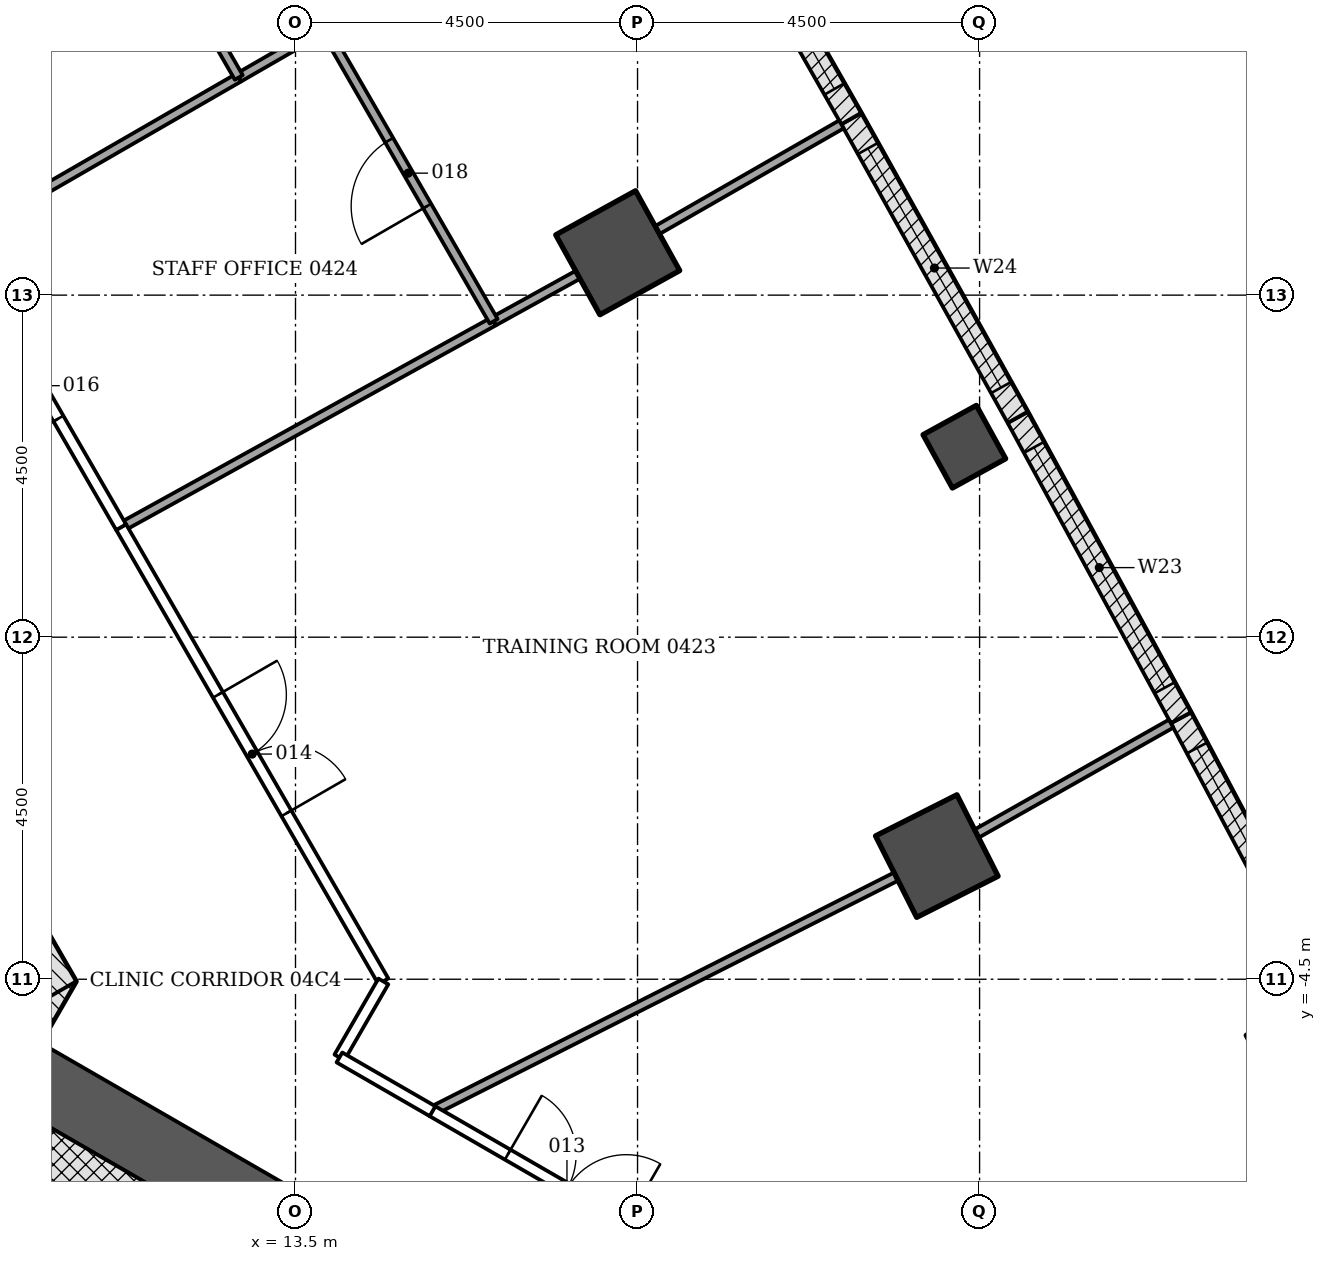
"""IFC4 building model, lengths in metres.
Left out: names, types, materials, properties, quantities, classifications, styles, units other than length and angle.
Written with IfcOpenShell. Run it as: python <this file> out.ifc"""

import sys

from ifc_helpers import new_model, si_unit, direction, frame, frame_2d, origin, origin_2d, place, context, subcontext, project, spatial, rectangle, extrude, element, fill, save


model = new_model("IFC4")
c1 = context("Model", 3, precision=1e-05, world=origin(), true_north=direction((0.0, 1.0)))
c2 = subcontext(c1, "Body", "Model", "MODEL_VIEW")
j1 = project(units=[si_unit("LENGTHUNIT", "METRE"), si_unit("PLANEANGLEUNIT", "RADIAN")], contexts=[c1])
p1 = place(None, origin())
s1 = spatial("IfcSite", under=j1, at=p1, CompositionType="ELEMENT")
p2 = place(p1, origin())
s2 = spatial("IfcBuilding", under=s1, at=p2, CompositionType="ELEMENT")
p3 = place(p2, frame((0.0, 0.0, 19.5)))
s3 = spatial("IfcBuildingStorey", under=s2, at=p3, CompositionType="ELEMENT", Elevation=19.5)
for number, where, z_axis, x_axis in (
    (1, (21.937, -2.88, -0.25), (0.0, 0.0, 1.0), (0.893, 0.451, 0.0)),
    (2, (17.739, 5.058, -0.25), (0.0, 0.0, 1.0), (0.875, 0.484, 0.0)),
):
    element("IfcColumn", number, at=place(p3, frame(where, z_axis=z_axis, x_axis=x_axis)), inside=s3, PredefinedType="COLUMN", context=c2, shape_type="SweptSolid", body=[
        extrude(rectangle(XDim=1.2, YDim=1.2, at=origin_2d()), origin(), (0.0, 0.0, 1.0), 4.55),
    ])
for number, where, z_axis, x_axis in (
    (3, (26.548, -5.406, -0.25), (0.0, 0.0, 1.0), (0.886, 0.464, 0.0)),
    (4, (22.3, 2.506, -0.25), (0.0, 0.0, 1.0), (0.876, 0.482, 0.0)),
):
    element("IfcColumn", number, at=place(p3, frame(where, z_axis=z_axis, x_axis=x_axis)), inside=s3, PredefinedType="COLUMN", context=c2, shape_type="SweptSolid", body=[
        extrude(rectangle(XDim=0.8, YDim=0.8, at=origin_2d()), origin(), (0.0, 0.0, 1.0), 4.55),
    ])
p4 = place(p3, frame((8.926, -6.753, -0.25), z_axis=(0.0, 0.0, 1.0), x_axis=(0.500042739161, 0.866000726912, 0.0)))
e5 = element("IfcWall", 5, at=p4, inside=s3, PredefinedType="SHEAR", context=c2, shape_type="SweptSolid", body=[
    extrude(rectangle(XDim=2.771, YDim=0.7, at=frame_2d((1.386, 0.0))), origin(), (0.0, 0.0, 1.0), 4.55),
])
p5 = place(p3, frame((10.311, -4.703, -0.25), z_axis=(0.0, 0.0, 1.0), x_axis=(-0.500001446645, 0.866024568562, 0.0)))
e6 = element("IfcWall", 6, at=p5, inside=s3, PredefinedType="SHEAR", context=c2, shape_type="SweptSolid", body=[
    extrude(rectangle(XDim=18.458, YDim=0.7, at=frame_2d((9.229, 0.0))), origin(), (0.0, 0.0, 1.0), 4.55),
])
p6 = place(p5, frame((8.7, 0.0, 0.25)))
e7 = element("IfcOpeningElement", 7, at=p6, cuts=e6, PredefinedType="OPENING", context=c2, shape_type="SweptSolid", body=[
    extrude(rectangle(XDim=1.0, YDim=2.1, at=frame_2d((0.5, 1.05))), frame((0.0, 0.36, 0.0), z_axis=(0.0, -1.0, 0.0), x_axis=(1.0, 0.0, 0.0)), (0.0, 0.0, 1.0), 0.72),
])
p7 = place(p5, frame((4.002, 0.0, 0.25)))
e8 = element("IfcOpeningElement", 8, at=p7, cuts=e6, PredefinedType="OPENING", context=c2, shape_type="SweptSolid", body=[
    extrude(rectangle(XDim=0.9, YDim=2.1, at=frame_2d((0.45, 1.05))), frame((0.0, 0.36, 0.0), z_axis=(0.0, -1.0, 0.0), x_axis=(1.0, 0.0, 0.0)), (0.0, 0.0, 1.0), 0.72),
])
p8 = place(p5, frame((14.093, 0.0, 0.25)))
e9 = element("IfcOpeningElement", 9, at=p8, cuts=e6, PredefinedType="OPENING", context=c2, shape_type="SweptSolid", body=[
    extrude(rectangle(XDim=0.9, YDim=2.1, at=frame_2d((0.45, 1.05))), frame((0.0, 0.36, 0.0), z_axis=(0.0, -1.0, 0.0), x_axis=(1.0, 0.0, 0.0)), (0.0, 0.0, 1.0), 0.72),
])
p9 = place(p3, frame((9.922, -5.728, -0.25), z_axis=(0.0, 0.0, 1.0), x_axis=(0.866028046028, -0.499995423472, 0.0)))
e10 = element("IfcWall", 10, at=p9, inside=s3, PredefinedType="SHEAR", context=c2, shape_type="SweptSolid", body=[
    extrude(rectangle(XDim=14.633, YDim=0.9, at=frame_2d((7.316, 0.0))), origin(), (0.0, 0.0, 1.0), 4.55),
])
p10 = place(p9, frame((7.35, 0.0, 0.25)))
e11 = element("IfcOpeningElement", 11, at=p10, cuts=e10, PredefinedType="OPENING", context=c2, shape_type="SweptSolid", body=[
    extrude(rectangle(XDim=1.5, YDim=2.1, at=frame_2d((0.75, 1.05))), frame((0.0, 0.46, 0.0), z_axis=(0.0, -1.0, 0.0), x_axis=(1.0, 0.0, 0.0)), (0.0, 0.0, 1.0), 0.92),
])
p11 = place(p3, frame((25.15, -1.062, 0.0), z_axis=(0.0, 0.0, 1.0), x_axis=(0.468566202388, -0.883428386447, 0.0)))
e12 = element("IfcWall", 12, at=p11, inside=s3, PredefinedType="NOTDEFINED", context=c2, shape_type="SweptSolid", body=[
    extrude(rectangle(XDim=4.496, YDim=0.3, at=frame_2d((2.248, 0.0))), origin(), (0.0, 0.0, 1.0), 4.3),
])
p12 = place(p11, frame((0.448, 0.0, 1.5)))
e13 = element("IfcOpeningElement", 13, at=p12, cuts=e12, PredefinedType="OPENING", context=c2, shape_type="SweptSolid", body=[
    extrude(rectangle(XDim=3.6, YDim=1.8, at=frame_2d((1.8, 0.9))), frame((0.0, 0.16, 0.0), z_axis=(0.0, -1.0, 0.0), x_axis=(1.0, 0.0, 0.0)), (0.0, 0.0, 1.0), 0.32),
])
p13 = place(p3, frame((23.001, 2.89, 0.0), z_axis=(0.0, 0.0, 1.0), x_axis=(0.477577109439, -0.878589838628, 0.0)))
e14 = element("IfcWall", 14, at=p13, inside=s3, PredefinedType="NOTDEFINED", context=c2, shape_type="SweptSolid", body=[
    extrude(rectangle(XDim=4.496, YDim=0.3, at=frame_2d((2.248, 0.0))), origin(), (0.0, 0.0, 1.0), 4.3),
])
p14 = place(p13, frame((0.448, 0.0, 1.5)))
e15 = element("IfcOpeningElement", 15, at=p14, cuts=e14, PredefinedType="OPENING", context=c2, shape_type="SweptSolid", body=[
    extrude(rectangle(XDim=3.6, YDim=1.8, at=frame_2d((1.8, 0.9))), frame((0.0, 0.16, 0.0), z_axis=(0.0, -1.0, 0.0), x_axis=(1.0, 0.0, 0.0)), (0.0, 0.0, 1.0), 0.32),
])
p15 = place(p3, frame((20.812, 6.82, 0.0), z_axis=(0.0, 0.0, 1.0), x_axis=(0.486606252415, -0.873621402617, 0.0)))
e16 = element("IfcWall", 16, at=p15, inside=s3, PredefinedType="NOTDEFINED", context=c2, shape_type="SweptSolid", body=[
    extrude(rectangle(XDim=4.496, YDim=0.3, at=frame_2d((2.248, 0.0))), origin(), (0.0, 0.0, 1.0), 4.3),
])
p16 = place(p15, frame((0.448, 0.0, 1.5)))
e17 = element("IfcOpeningElement", 17, at=p16, cuts=e16, PredefinedType="OPENING", context=c2, shape_type="SweptSolid", body=[
    extrude(rectangle(XDim=3.6, YDim=1.8, at=frame_2d((1.8, 0.9))), frame((0.0, 0.16, 0.0), z_axis=(0.0, -1.0, 0.0), x_axis=(1.0, 0.0, 0.0)), (0.0, 0.0, 1.0), 0.32),
])
p17 = place(p3, frame((18.583, 10.728, 0.0), z_axis=(0.0, 0.0, 1.0), x_axis=(0.495524760411, -0.868593812907, 0.0)))
e18 = element("IfcWall", 18, at=p17, inside=s3, PredefinedType="NOTDEFINED", context=c2, shape_type="SweptSolid", body=[
    extrude(rectangle(XDim=4.496, YDim=0.3, at=frame_2d((2.248, 0.0))), origin(), (0.0, 0.0, 1.0), 4.3),
])
p18 = place(p17, frame((0.448, 0.0, 1.5)))
e19 = element("IfcOpeningElement", 19, at=p18, cuts=e18, PredefinedType="OPENING", context=c2, shape_type="SweptSolid", body=[
    extrude(rectangle(XDim=3.6, YDim=1.8, at=frame_2d((1.8, 0.9))), frame((0.0, 0.16, 0.0), z_axis=(0.0, -1.0, 0.0), x_axis=(1.0, 0.0, 0.0)), (0.0, 0.0, 1.0), 0.32),
])
p19 = place(p3, frame((9.413, -6.61, -0.25), z_axis=(0.0, 0.0, 1.0), x_axis=(0.866018442252, -0.500012057535, 0.0)))
e20 = element("IfcWall", 20, at=p19, inside=s3, PredefinedType="SHEAR", context=c2, shape_type="SweptSolid", body=[
    extrude(rectangle(XDim=7.2, YDim=1.136, at=frame_2d((3.6, 0.0))), origin(), (0.0, 0.0, 1.0), 4.55),
])
p20 = place(p3, frame((21.401, -3.15, 0.0), z_axis=(0.0, 0.0, 1.0), x_axis=(-0.892483368892, -0.451080299117, 0.0)))
e21 = element("IfcWall", 21, at=p20, inside=s3, PredefinedType="PARTITIONING", context=c2, shape_type="SweptSolid", body=[
    extrude(rectangle(XDim=6.837, YDim=0.12, at=frame_2d((3.418, 0.0))), origin(), (0.0, 0.0, 1.0), 3.767),
])
p21 = place(p3, frame((25.02, -1.138, 0.0), z_axis=(0.0, 0.0, 1.0), x_axis=(-0.870620069476, -0.491955988505, 0.0)))
e22 = element("IfcWall", 22, at=p21, inside=s3, PredefinedType="PARTITIONING", context=c2, shape_type="SweptSolid", body=[
    extrude(rectangle(XDim=2.939, YDim=0.12, at=frame_2d((1.47, 0.0))), origin(), (0.0, 0.0, 1.0), 3.683),
])
p22 = place(p3, frame((15.296, -6.233, 0.0), z_axis=(0.0, 0.0, 1.0), x_axis=(0.866035577775, -0.499982377718, 0.0)))
e23 = element("IfcWall", 23, at=p22, inside=s3, PredefinedType="PARTITIONING", context=c2, shape_type="SweptSolid", body=[
    extrude(rectangle(XDim=4.093, YDim=0.15, at=frame_2d((2.046, 0.0))), origin(), (0.0, 0.0, 1.0), 3.767),
])
p23 = place(p22, frame((1.15, 0.0, 0.0)))
e24 = element("IfcOpeningElement", 24, at=p23, cuts=e23, PredefinedType="OPENING", context=c2, shape_type="SweptSolid", body=[
    extrude(rectangle(XDim=1.8, YDim=2.1, at=frame_2d((0.9, 1.05))), frame((0.0, 0.085, 0.0), z_axis=(0.0, -1.0, 0.0), x_axis=(1.0, 0.0, 0.0)), (0.0, 0.0, 1.0), 0.17),
])
p24 = place(p3, frame((11.205, 1.45, 0.0), z_axis=(0.0, 0.0, 1.0), x_axis=(0.500008243208, -0.866020644514, 0.0)))
e25 = element("IfcWall", 25, at=p24, inside=s3, PredefinedType="PARTITIONING", context=c2, shape_type="SweptSolid", body=[
    extrude(rectangle(XDim=6.902, YDim=0.15, at=frame_2d((3.451, 0.0))), origin(), (0.0, 0.0, 1.0), 3.698),
])
p25 = place(p24, frame((2.55, 0.0, 0.0)))
e26 = element("IfcOpeningElement", 26, at=p25, cuts=e25, PredefinedType="OPENING", context=c2, shape_type="SweptSolid", body=[
    extrude(rectangle(XDim=1.8, YDim=2.1, at=frame_2d((0.9, 1.05))), frame((0.0, 0.085, 0.0), z_axis=(0.0, -1.0, 0.0), x_axis=(1.0, 0.0, 0.0)), (0.0, 0.0, 1.0), 0.17),
])
p26 = place(p3, frame((14.656, -4.529, 0.0), z_axis=(0.0, 0.0, 1.0), x_axis=(-0.500502949238, -0.865734831114, 0.0)))
e27 = element("IfcWall", 27, at=p26, inside=s3, PredefinedType="PARTITIONING", context=c2, shape_type="SweptSolid", body=[
    extrude(rectangle(XDim=1.155, YDim=0.15, at=frame_2d((0.578, 0.0))), origin(), (0.0, 0.0, 1.0), 4.3),
])
p27 = place(p3, frame((14.078, -5.529, 0.0), z_axis=(0.0, 0.0, 1.0), x_axis=(0.866110865696, -0.499851946404, 0.0)))
e28 = element("IfcWall", 28, at=p27, inside=s3, PredefinedType="PARTITIONING", context=c2, shape_type="SweptSolid", body=[
    extrude(rectangle(XDim=1.415, YDim=0.15, at=frame_2d((0.707, 0.0))), origin(), (0.0, 0.0, 1.0), 3.767),
])
p28 = place(p3, frame((16.108, 4.155, 0.0), z_axis=(0.0, 0.0, 1.0), x_axis=(-0.875228903622, -0.483708968559, 0.0)))
e29 = element("IfcWall", 29, at=p28, inside=s3, PredefinedType="PARTITIONING", context=c2, shape_type="SweptSolid", body=[
    extrude(rectangle(XDim=5.598, YDim=0.12, at=frame_2d((2.799, 0.0))), origin(), (0.0, 0.0, 1.0), 3.698),
])
p29 = place(p3, frame((17.214, 4.767, 0.0), z_axis=(0.0, 0.0, 1.0), x_axis=(-0.875140294724, -0.483869263904, 0.0)))
e30 = element("IfcWall", 30, at=p29, inside=s3, PredefinedType="PARTITIONING", context=c2, shape_type="SweptSolid", body=[
    extrude(rectangle(XDim=1.263, YDim=0.12, at=frame_2d((0.631, 0.0))), origin(), (0.0, 0.0, 1.0), 3.698),
])
p30 = place(p3, frame((20.682, 6.746, 0.0), z_axis=(0.0, 0.0, 1.0), x_axis=(-0.867283853893, -0.49781393791, 0.0)))
e31 = element("IfcWall", 31, at=p30, inside=s3, PredefinedType="PARTITIONING", context=c2, shape_type="SweptSolid", body=[
    extrude(rectangle(XDim=2.792, YDim=0.12, at=frame_2d((1.396, 0.0))), origin(), (0.0, 0.0, 1.0), 3.683),
])
p31 = place(p3, frame((11.206, 1.447, 0.0), z_axis=(0.0, 0.0, 1.0), x_axis=(-0.50014197282, 0.865943420221, 0.0)))
e32 = element("IfcWall", 32, at=p31, inside=s3, PredefinedType="PARTITIONING", context=c2, shape_type="SweptSolid", body=[
    extrude(rectangle(XDim=4.349, YDim=0.15, at=frame_2d((2.174, 0.0))), origin(), (0.0, 0.0, 1.0), 3.688),
])
p32 = place(p31, frame((1.65, 0.0, 0.0)))
e33 = element("IfcOpeningElement", 33, at=p32, cuts=e32, PredefinedType="OPENING", context=c2, shape_type="SweptSolid", body=[
    extrude(rectangle(XDim=1.0, YDim=2.1, at=frame_2d((0.5, 1.05))), frame((0.0, 0.085, 0.0), z_axis=(0.0, -1.0, 0.0), x_axis=(1.0, 0.0, 0.0)), (0.0, 0.0, 1.0), 0.17),
])
p33 = place(p3, frame((16.107, 4.156, 0.0), z_axis=(0.0, 0.0, 1.0), x_axis=(-0.499836357881, 0.866119861994, 0.0)))
e34 = element("IfcWall", 34, at=p33, inside=s3, PredefinedType="PARTITIONING", context=c2, shape_type="SweptSolid", body=[
    extrude(rectangle(XDim=4.453, YDim=0.12, at=frame_2d((2.227, 0.0))), origin(), (0.0, 0.0, 1.0), 3.688),
])
p34 = place(p33, frame((1.75, 0.0, 0.0)))
e35 = element("IfcOpeningElement", 35, at=p34, cuts=e34, PredefinedType="OPENING", context=c2, shape_type="SweptSolid", body=[
    extrude(rectangle(XDim=1.0, YDim=2.1, at=frame_2d((0.5, 1.05))), frame((0.0, 0.07, 0.0), z_axis=(0.0, -1.0, 0.0), x_axis=(1.0, 0.0, 0.0)), (0.0, 0.0, 1.0), 0.14),
])
p35 = place(p3, frame((12.755, 7.363, 0.0), z_axis=(0.0, 0.0, 1.0), x_axis=(-0.866173292352, -0.499743761959, 0.0)))
e36 = element("IfcWall", 36, at=p35, inside=s3, PredefinedType="PARTITIONING", context=c2, shape_type="SweptSolid", body=[
    extrude(rectangle(XDim=4.298, YDim=0.12, at=frame_2d((2.149, 0.0))), origin(), (0.0, 0.0, 1.0), 3.688),
])
p36 = place(p3, frame((13.881, 8.013, 0.0), z_axis=(0.0, 0.0, 1.0), x_axis=(-0.866223138365, -0.499657357156, 0.0)))
e37 = element("IfcWall", 37, at=p36, inside=s3, PredefinedType="PARTITIONING", context=c2, shape_type="SweptSolid", body=[
    extrude(rectangle(XDim=1.299, YDim=0.12, at=frame_2d((0.649, 0.0))), origin(), (0.0, 0.0, 1.0), 3.688),
])
p37 = place(p3, frame((12.754, 7.364, 0.0), z_axis=(0.0, 0.0, 1.0), x_axis=(-0.499862428325, 0.86610481626, 0.0)))
e38 = element("IfcWall", 38, at=p37, inside=s3, PredefinedType="PARTITIONING", context=c2, shape_type="SweptSolid", body=[
    extrude(rectangle(XDim=4.429, YDim=0.12, at=frame_2d((2.214, 0.0))), origin(), (0.0, 0.0, 1.0), 3.688),
])
p38 = place(p37, frame((1.75, 0.0, 0.0)))
e39 = element("IfcOpeningElement", 39, at=p38, cuts=e38, PredefinedType="OPENING", context=c2, shape_type="SweptSolid", body=[
    extrude(rectangle(XDim=1.0, YDim=2.1, at=frame_2d((0.5, 1.05))), frame((0.0, 0.07, 0.0), z_axis=(0.0, -1.0, 0.0), x_axis=(1.0, 0.0, 0.0)), (0.0, 0.0, 1.0), 0.14),
])
p39 = place(p12, origin())
e40 = element("IfcWindow", 40, at=p39, inside=s3, PartitioningType="SINGLE_PANEL", PredefinedType="WINDOW", context=c2, shape_type="SweptSolid", body=[
    extrude(rectangle(XDim=3.6, YDim=1.8, at=frame_2d((1.8, 0.9))), frame((0.0, 0.03, 0.0), z_axis=(0.0, -1.0, 0.0), x_axis=(1.0, 0.0, 0.0)), (0.0, 0.0, 1.0), 0.06),
])
fill(e13, e40)
p40 = place(p14, origin())
e41 = element("IfcWindow", 41, at=p40, inside=s3, PartitioningType="SINGLE_PANEL", PredefinedType="WINDOW", context=c2, shape_type="SweptSolid", body=[
    extrude(rectangle(XDim=3.6, YDim=1.8, at=frame_2d((1.8, 0.9))), frame((0.0, 0.03, 0.0), z_axis=(0.0, -1.0, 0.0), x_axis=(1.0, 0.0, 0.0)), (0.0, 0.0, 1.0), 0.06),
])
fill(e15, e41)
p41 = place(p16, origin())
e42 = element("IfcWindow", 42, at=p41, inside=s3, PartitioningType="SINGLE_PANEL", PredefinedType="WINDOW", context=c2, shape_type="SweptSolid", body=[
    extrude(rectangle(XDim=3.6, YDim=1.8, at=frame_2d((1.8, 0.9))), frame((0.0, 0.03, 0.0), z_axis=(0.0, -1.0, 0.0), x_axis=(1.0, 0.0, 0.0)), (0.0, 0.0, 1.0), 0.06),
])
fill(e17, e42)
p42 = place(p18, origin())
e43 = element("IfcWindow", 43, at=p42, inside=s3, PartitioningType="SINGLE_PANEL", PredefinedType="WINDOW", context=c2, shape_type="SweptSolid", body=[
    extrude(rectangle(XDim=3.6, YDim=1.8, at=frame_2d((1.8, 0.9))), frame((0.0, 0.03, 0.0), z_axis=(0.0, -1.0, 0.0), x_axis=(1.0, 0.0, 0.0)), (0.0, 0.0, 1.0), 0.06),
])
fill(e19, e43)
p43 = place(p23, origin())
e44 = element("IfcDoor", 44, at=p43, inside=s3, OperationType="DOUBLE_DOOR_SINGLE_SWING", PredefinedType="DOOR", context=c2, shape_type="SweptSolid", body=[
    extrude(rectangle(XDim=1.8, YDim=2.1, at=frame_2d((0.9, 1.05))), frame((0.0, 0.025, 0.0), z_axis=(0.0, -1.0, 0.0), x_axis=(1.0, 0.0, 0.0)), (0.0, 0.0, 1.0), 0.05),
])
fill(e24, e44)
p44 = place(p25, origin())
e45 = element("IfcDoor", 45, at=p44, inside=s3, OperationType="DOUBLE_DOOR_SINGLE_SWING", PredefinedType="DOOR", context=c2, shape_type="SweptSolid", body=[
    extrude(rectangle(XDim=1.8, YDim=2.1, at=frame_2d((0.9, 1.05))), frame((0.0, 0.025, 0.0), z_axis=(0.0, -1.0, 0.0), x_axis=(1.0, 0.0, 0.0)), (0.0, 0.0, 1.0), 0.05),
])
fill(e26, e45)
p45 = place(p32, origin())
e46 = element("IfcDoor", 46, at=p45, inside=s3, OperationType="SINGLE_SWING_RIGHT", PredefinedType="DOOR", context=c2, shape_type="SweptSolid", body=[
    extrude(rectangle(XDim=1.0, YDim=2.1, at=frame_2d((0.5, 1.05))), frame((0.0, 0.025, 0.0), z_axis=(0.0, -1.0, 0.0), x_axis=(1.0, 0.0, 0.0)), (0.0, 0.0, 1.0), 0.05),
])
fill(e33, e46)
p46 = place(p34, origin())
e47 = element("IfcDoor", 47, at=p46, inside=s3, OperationType="SINGLE_SWING_LEFT", PredefinedType="DOOR", context=c2, shape_type="SweptSolid", body=[
    extrude(rectangle(XDim=1.0, YDim=2.1, at=frame_2d((0.5, 1.05))), frame((0.0, 0.025, 0.0), z_axis=(0.0, -1.0, 0.0), x_axis=(1.0, 0.0, 0.0)), (0.0, 0.0, 1.0), 0.05),
])
fill(e35, e47)
save(model, sys.argv[1])
